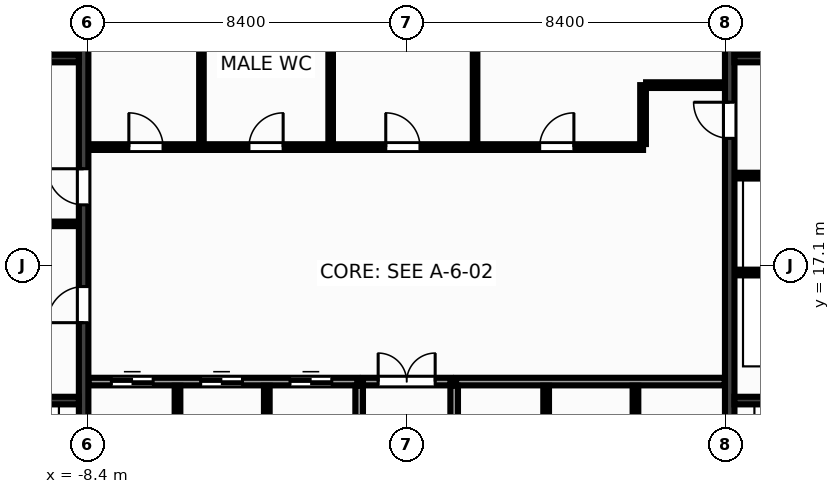
"""IFC4 building model, lengths in metres.
Left out: names, types, materials, properties, quantities, classifications, styles, units other than length and angle.
Written with IfcOpenShell. Run it as: python <this file> out.ifc"""

import sys

from ifc_helpers import new_model, si_unit, direction, frame, frame_2d, origin, place, context, subcontext, project, spatial, rectangle, extrude, source, transform, mapped, element, fill, save


model = new_model("IFC4")
c1 = context("Model", 3, precision=1e-05, world=origin(), true_north=direction((0.0, 1.0)))
c2 = subcontext(c1, "Body", "Model", "MODEL_VIEW")
j1 = project(units=[si_unit("LENGTHUNIT", "METRE"), si_unit("PLANEANGLEUNIT", "RADIAN")], contexts=[c1])
p1 = place(None, origin())
s1 = spatial("IfcSite", under=j1, at=p1, CompositionType="ELEMENT")
p2 = place(p1, origin())
s2 = spatial("IfcBuilding", under=s1, at=p2, CompositionType="ELEMENT")
p3 = place(p2, frame((0.0, 0.0, 9.65)))
s3 = spatial("IfcBuildingStorey", under=s2, at=p3, CompositionType="ELEMENT", Elevation=9.65)
m1 = source(origin(), c2, "Body", "SweptSolid", [
    extrude(rectangle(XDim=12.8, YDim=0.25, at=frame_2d((6.4, 0.0))), origin(), (0.0, 0.0, 1.0), 4.65),
])
p4 = place(p3, frame((-8.5, 10.6, 0.0), z_axis=(0.0, 0.0, 1.0), x_axis=(0.0, 1.0, 0.0)))
e1 = element("IfcWall", 1, at=p4, inside=s3, PredefinedType="SHEAR", context=c2, shape_type="MappedRepresentation", body=[
    mapped(m1, transform((0.0, 0.0, 0.0), x_axis=(1.0, 0.0, 0.0), y_axis=(0.0, 1.0, 0.0), z_axis=(0.0, 0.0, 1.0), scale=1.0)),
])
p5 = place(p4, frame((5.0, 0.0, 0.0)))
e2 = element("IfcOpeningElement", 2, at=p5, cuts=e1, PredefinedType="OPENING", context=c2, shape_type="SweptSolid", body=[
    extrude(rectangle(XDim=0.95, YDim=2.15, at=frame_2d((0.475, 1.075))), frame((0.0, 0.137, 0.0), z_axis=(0.0, -1.0, 0.0), x_axis=(1.0, 0.0, 0.0)), (0.0, 0.0, 1.0), 0.274),
])
p6 = place(p4, frame((8.1, 0.0, 0.0)))
e3 = element("IfcOpeningElement", 3, at=p6, cuts=e1, PredefinedType="OPENING", context=c2, shape_type="SweptSolid", body=[
    extrude(rectangle(XDim=0.95, YDim=2.15, at=frame_2d((0.475, 1.075))), frame((0.0, 0.137, 0.0), z_axis=(0.0, -1.0, 0.0), x_axis=(1.0, 0.0, 0.0)), (0.0, 0.0, 1.0), 0.274),
])
p7 = place(p3, frame((8.5, 10.6, 0.0), z_axis=(0.0, 0.0, 1.0), x_axis=(0.0, 1.0, 0.0)))
e4 = element("IfcWall", 4, at=p7, inside=s3, PredefinedType="SHEAR", context=c2, shape_type="MappedRepresentation", body=[
    mapped(m1, transform((0.0, 0.0, 0.0), x_axis=(1.0, 0.0, 0.0), y_axis=(0.0, 1.0, 0.0), z_axis=(0.0, 0.0, 1.0), scale=1.0)),
])
p8 = place(p7, frame((9.85, 0.0, 0.0)))
e5 = element("IfcOpeningElement", 5, at=p8, cuts=e4, PredefinedType="OPENING", context=c2, shape_type="SweptSolid", body=[
    extrude(rectangle(XDim=0.95, YDim=2.15, at=frame_2d((0.475, 1.075))), frame((0.0, 0.137, 0.0), z_axis=(0.0, -1.0, 0.0), x_axis=(1.0, 0.0, 0.0)), (0.0, 0.0, 1.0), 0.274),
])
m2 = source(origin(), c2, "Body", "SweptSolid", [
    extrude(rectangle(XDim=2.825, YDim=0.2, at=frame_2d((1.413, 0.0))), origin(), (0.0, 0.0, 1.0), 4.65),
])
for number, where, z_axis, x_axis in (
    (6, (-11.45, 13.55, 0.0), (0.0, 0.0, 1.0), (1.0, 0.0, 0.0)),
    (7, (8.625, 13.55, 0.0), (0.0, 0.0, 1.0), (1.0, 0.0, 0.0)),
):
    element("IfcWall", number, at=place(p3, frame(where, z_axis=z_axis, x_axis=x_axis)), inside=s3, PredefinedType="SHEAR", context=c2, shape_type="MappedRepresentation", body=[
        mapped(m2, transform((0.0, 0.0, 0.0), x_axis=(1.0, 0.0, 0.0), y_axis=(0.0, 1.0, 0.0), z_axis=(0.0, 0.0, 1.0), scale=1.0)),
    ])
m3 = source(origin(), c2, "Body", "SweptSolid", [
    extrude(rectangle(XDim=3.02, YDim=0.2, at=frame_2d((1.51, 0.0))), origin(), (0.0, 0.0, 1.0), 4.65),
])
for number, where, z_axis, x_axis in (
    (8, (-11.645, 22.55, 0.0), (0.0, 0.0, 1.0), (1.0, 0.0, 0.0)),
    (9, (8.625, 22.55, 0.0), (0.0, 0.0, 1.0), (1.0, 0.0, 0.0)),
):
    element("IfcWall", number, at=place(p3, frame(where, z_axis=z_axis, x_axis=x_axis)), inside=s3, PredefinedType="SHEAR", context=c2, shape_type="MappedRepresentation", body=[
        mapped(m3, transform((0.0, 0.0, 0.0), x_axis=(1.0, 0.0, 0.0), y_axis=(0.0, 1.0, 0.0), z_axis=(0.0, 0.0, 1.0), scale=1.0)),
    ])
m4 = source(origin(), c2, "Body", "SweptSolid", [
    extrude(rectangle(XDim=3.01, YDim=0.12, at=frame_2d((1.505, 0.0))), origin(), (0.0, 0.0, 1.0), 4.37),
])
p9 = place(p3, frame((-11.64, 18.2, 0.0), z_axis=(0.0, 0.0, 1.0), x_axis=(1.0, 0.0, 0.0)))
e10 = element("IfcWall", 10, at=p9, inside=s3, PredefinedType="PARTITIONING", context=c2, shape_type="MappedRepresentation", body=[
    mapped(m4, transform((0.0, 0.0, 0.0), x_axis=(1.0, 0.0, 0.0), y_axis=(0.0, 1.0, 0.0), z_axis=(0.0, 0.0, 1.0), scale=1.0)),
])
m5 = source(origin(), c2, "Body", "SweptSolid", [
    extrude(rectangle(XDim=3.01, YDim=0.15, at=frame_2d((1.505, 0.0))), origin(), (0.0, 0.0, 1.0), 4.37),
])
for number, where, z_axis, x_axis in (
    (11, (8.63, 16.92, 0.0), (0.0, 0.0, 1.0), (1.0, 0.0, 0.0)),
    (12, (8.63, 19.47, 0.0), (0.0, 0.0, 1.0), (1.0, 0.0, 0.0)),
):
    element("IfcWall", number, at=place(p3, frame(where, z_axis=z_axis, x_axis=x_axis)), inside=s3, PredefinedType="PARTITIONING", context=c2, shape_type="MappedRepresentation", body=[
        mapped(m5, transform((0.0, 0.0, 0.0), x_axis=(1.0, 0.0, 0.0), y_axis=(0.0, 1.0, 0.0), z_axis=(0.0, 0.0, 1.0), scale=1.0)),
    ])
m6 = source(origin(), c2, "Body", "SweptSolid", [
    extrude(rectangle(XDim=7.07, YDim=0.2, at=frame_2d((3.535, 0.0))), origin(), (0.0, 0.0, 1.0), 4.37),
])
p10 = place(p3, frame((-8.37, 14.05, 0.0), z_axis=(0.0, 0.0, 1.0), x_axis=(1.0, 0.0, 0.0)))
e13 = element("IfcWall", 13, at=p10, inside=s3, PredefinedType="PARTITIONING", context=c2, shape_type="MappedRepresentation", body=[
    mapped(m6, transform((0.0, 0.0, 0.0), x_axis=(1.0, 0.0, 0.0), y_axis=(0.0, 1.0, 0.0), z_axis=(0.0, 0.0, 1.0), scale=1.0)),
])
p11 = place(p10, frame((0.6, 0.0, 0.0)))
e14 = element("IfcOpeningElement", 14, at=p11, cuts=e13, PredefinedType="OPENING", context=c2, shape_type="SweptSolid", body=[
    extrude(rectangle(XDim=1.1, YDim=2.15, at=frame_2d((0.55, 1.075))), frame((0.0, 0.112, 0.0), z_axis=(0.0, -1.0, 0.0), x_axis=(1.0, 0.0, 0.0)), (0.0, 0.0, 1.0), 0.224),
])
p12 = place(p10, frame((2.95, 0.0, 0.0)))
e15 = element("IfcOpeningElement", 15, at=p12, cuts=e13, PredefinedType="OPENING", context=c2, shape_type="SweptSolid", body=[
    extrude(rectangle(XDim=1.1, YDim=2.15, at=frame_2d((0.55, 1.075))), frame((0.0, 0.112, 0.0), z_axis=(0.0, -1.0, 0.0), x_axis=(1.0, 0.0, 0.0)), (0.0, 0.0, 1.0), 0.224),
])
p13 = place(p10, frame((5.3, 0.0, 0.0)))
e16 = element("IfcOpeningElement", 16, at=p13, cuts=e13, PredefinedType="OPENING", context=c2, shape_type="SweptSolid", body=[
    extrude(rectangle(XDim=1.1, YDim=2.15, at=frame_2d((0.55, 1.075))), frame((0.0, 0.112, 0.0), z_axis=(0.0, -1.0, 0.0), x_axis=(1.0, 0.0, 0.0)), (0.0, 0.0, 1.0), 0.224),
])
p14 = place(p3, frame((1.3, 14.05, 0.0), z_axis=(0.0, 0.0, 1.0), x_axis=(1.0, 0.0, 0.0)))
e17 = element("IfcWall", 17, at=p14, inside=s3, PredefinedType="PARTITIONING", context=c2, shape_type="MappedRepresentation", body=[
    mapped(m6, transform((0.0, 0.0, 0.0), x_axis=(1.0, 0.0, 0.0), y_axis=(0.0, 1.0, 0.0), z_axis=(0.0, 0.0, 1.0), scale=1.0)),
])
m7 = source(origin(), c2, "Body", "SweptSolid", [
    extrude(rectangle(XDim=3.34, YDim=0.2, at=frame_2d((1.67, 0.0))), origin(), (0.0, 0.0, 1.0), 4.37),
])
for number, where, z_axis, x_axis in (
    (18, (-1.25, 10.6, 0.0), (0.0, 0.0, 1.0), (0.0, 1.0, 0.0)),
    (19, (1.25, 10.6, 0.0), (0.0, 0.0, 1.0), (0.0, 1.0, 0.0)),
):
    element("IfcWall", number, at=place(p3, frame(where, z_axis=z_axis, x_axis=x_axis)), inside=s3, PredefinedType="PARTITIONING", context=c2, shape_type="MappedRepresentation", body=[
        mapped(m7, transform((0.0, 0.0, 0.0), x_axis=(1.0, 0.0, 0.0), y_axis=(0.0, 1.0, 0.0), z_axis=(0.0, 0.0, 1.0), scale=1.0)),
    ])
m8 = source(origin(), c2, "Body", "SweptSolid", [
    extrude(rectangle(XDim=2.3, YDim=0.2, at=frame_2d((1.15, 0.0))), origin(), (0.0, 0.0, 1.0), 4.37),
])
p15 = place(p3, frame((-1.15, 14.05, 0.0), z_axis=(0.0, 0.0, 1.0), x_axis=(1.0, 0.0, 0.0)))
e20 = element("IfcWall", 20, at=p15, inside=s3, PredefinedType="PARTITIONING", context=c2, shape_type="MappedRepresentation", body=[
    mapped(m8, transform((0.0, 0.0, 0.0), x_axis=(1.0, 0.0, 0.0), y_axis=(0.0, 1.0, 0.0), z_axis=(0.0, 0.0, 1.0), scale=1.0)),
])
p16 = place(p15, frame((0.4, 0.0, 0.0)))
e21 = element("IfcOpeningElement", 21, at=p16, cuts=e20, PredefinedType="OPENING", context=c2, shape_type="SweptSolid", body=[
    extrude(rectangle(XDim=1.5, YDim=2.2, at=frame_2d((0.75, 1.1))), frame((0.0, 0.112, 0.0), z_axis=(0.0, -1.0, 0.0), x_axis=(1.0, 0.0, 0.0)), (0.0, 0.0, 1.0), 0.224),
])
m9 = source(origin(), c2, "Body", "SweptSolid", [
    extrude(rectangle(XDim=14.59, YDim=0.15, at=frame_2d((7.295, 0.0))), origin(), (0.0, 0.0, 1.0), 4.37),
])
p17 = place(p3, frame((-8.37, 20.22, 0.0), z_axis=(0.0, 0.0, 1.0), x_axis=(1.0, 0.0, 0.0)))
e22 = element("IfcWall", 22, at=p17, inside=s3, PredefinedType="PARTITIONING", context=c2, shape_type="MappedRepresentation", body=[
    mapped(m9, transform((0.0, 0.0, 0.0), x_axis=(1.0, 0.0, 0.0), y_axis=(0.0, 1.0, 0.0), z_axis=(0.0, 0.0, 1.0), scale=1.0)),
])
p18 = place(p17, frame((1.06, 0.0, 0.0)))
e23 = element("IfcOpeningElement", 23, at=p18, cuts=e22, PredefinedType="OPENING", context=c2, shape_type="SweptSolid", body=[
    extrude(rectangle(XDim=0.9, YDim=2.15, at=frame_2d((0.45, 1.075))), frame((0.0, 0.087, 0.0), z_axis=(0.0, -1.0, 0.0), x_axis=(1.0, 0.0, 0.0)), (0.0, 0.0, 1.0), 0.174),
])
p19 = place(p17, frame((4.22, 0.0, 0.0)))
e24 = element("IfcOpeningElement", 24, at=p19, cuts=e22, PredefinedType="OPENING", context=c2, shape_type="SweptSolid", body=[
    extrude(rectangle(XDim=0.9, YDim=2.15, at=frame_2d((0.45, 1.075))), frame((0.0, 0.087, 0.0), z_axis=(0.0, -1.0, 0.0), x_axis=(1.0, 0.0, 0.0)), (0.0, 0.0, 1.0), 0.174),
])
p20 = place(p17, frame((7.82, 0.0, 0.0)))
e25 = element("IfcOpeningElement", 25, at=p20, cuts=e22, PredefinedType="OPENING", context=c2, shape_type="SweptSolid", body=[
    extrude(rectangle(XDim=0.9, YDim=2.15, at=frame_2d((0.45, 1.075))), frame((0.0, 0.087, 0.0), z_axis=(0.0, -1.0, 0.0), x_axis=(1.0, 0.0, 0.0)), (0.0, 0.0, 1.0), 0.174),
])
p21 = place(p17, frame((11.87, 0.0, 0.0)))
e26 = element("IfcOpeningElement", 26, at=p21, cuts=e22, PredefinedType="OPENING", context=c2, shape_type="SweptSolid", body=[
    extrude(rectangle(XDim=0.9, YDim=2.15, at=frame_2d((0.45, 1.075))), frame((0.0, 0.087, 0.0), z_axis=(0.0, -1.0, 0.0), x_axis=(1.0, 0.0, 0.0)), (0.0, 0.0, 1.0), 0.174),
])
m10 = source(origin(), c2, "Body", "SweptSolid", [
    extrude(rectangle(XDim=1.55, YDim=0.15, at=frame_2d((0.775, 0.0))), origin(), (0.0, 0.0, 1.0), 4.37),
])
p22 = place(p3, frame((6.22, 20.3, 0.0), z_axis=(0.0, 0.0, 1.0), x_axis=(0.0, 1.0, 0.0)))
e27 = element("IfcWall", 27, at=p22, inside=s3, PredefinedType="PARTITIONING", context=c2, shape_type="MappedRepresentation", body=[
    mapped(m10, transform((0.0, 0.0, 0.0), x_axis=(1.0, 0.0, 0.0), y_axis=(0.0, 1.0, 0.0), z_axis=(0.0, 0.0, 1.0), scale=1.0)),
])
m11 = source(origin(), c2, "Body", "SweptSolid", [
    extrude(rectangle(XDim=2.07, YDim=0.15, at=frame_2d((1.035, 0.0))), origin(), (0.0, 0.0, 1.0), 4.37),
])
p23 = place(p3, frame((6.3, 21.85, 0.0), z_axis=(0.0, 0.0, 1.0), x_axis=(1.0, 0.0, 0.0)))
e28 = element("IfcWall", 28, at=p23, inside=s3, PredefinedType="PARTITIONING", context=c2, shape_type="MappedRepresentation", body=[
    mapped(m11, transform((0.0, 0.0, 0.0), x_axis=(1.0, 0.0, 0.0), y_axis=(0.0, 1.0, 0.0), z_axis=(0.0, 0.0, 1.0), scale=1.0)),
])
m12 = source(origin(), c2, "Body", "SweptSolid", [
    extrude(rectangle(XDim=3.34, YDim=0.15, at=frame_2d((1.67, 0.0))), origin(), (0.0, 0.0, 1.0), 4.37),
])
for number, where, z_axis, x_axis in (
    (29, (-6.03, 10.6, 0.0), (0.0, 0.0, 1.0), (0.0, 1.0, 0.0)),
    (30, (-3.68, 10.6, 0.0), (0.0, 0.0, 1.0), (0.0, 1.0, 0.0)),
    (31, (3.67, 10.6, 0.0), (0.0, 0.0, 1.0), (0.0, 1.0, 0.0)),
    (32, (6.02, 10.6, 0.0), (0.0, 0.0, 1.0), (0.0, 1.0, 0.0)),
):
    element("IfcWall", number, at=place(p3, frame(where, z_axis=z_axis, x_axis=x_axis)), inside=s3, PredefinedType="PARTITIONING", context=c2, shape_type="MappedRepresentation", body=[
        mapped(m12, transform((0.0, 0.0, 0.0), x_axis=(1.0, 0.0, 0.0), y_axis=(0.0, 1.0, 0.0), z_axis=(0.0, 0.0, 1.0), scale=1.0)),
    ])
m13 = source(origin(), c2, "Body", "SweptSolid", [
    extrude(rectangle(XDim=3.04, YDim=0.12, at=frame_2d((1.52, 0.0))), origin(), (0.0, 0.0, 1.0), 4.37),
])
for number, where, z_axis, x_axis in (
    (33, (-5.4, 20.32, 0.0), (0.0, 0.0, 1.0), (0.0, 1.0, 0.0)),
    (34, (-2.0, 20.32, 0.0), (0.0, 0.0, 1.0), (0.0, 1.0, 0.0)),
    (35, (1.8, 20.32, 0.0), (0.0, 0.0, 1.0), (0.0, 1.0, 0.0)),
):
    element("IfcWall", number, at=place(p3, frame(where, z_axis=z_axis, x_axis=x_axis)), inside=s3, PredefinedType="PARTITIONING", context=c2, shape_type="MappedRepresentation", body=[
        mapped(m13, transform((0.0, 0.0, 0.0), x_axis=(1.0, 0.0, 0.0), y_axis=(0.0, 1.0, 0.0), z_axis=(0.0, 0.0, 1.0), scale=1.0)),
    ])
m14 = source(origin(), c2, "Body", "SweptSolid", [
    extrude(rectangle(XDim=0.95, YDim=2.15, at=frame_2d((0.475, 1.075))), frame((0.0, 0.025, 0.0), z_axis=(0.0, -1.0, 0.0), x_axis=(1.0, 0.0, 0.0)), (0.0, 0.0, 1.0), 0.05),
])
p24 = place(p5, origin())
e36 = element("IfcDoor", 36, at=p24, inside=s3, OperationType="SINGLE_SWING_LEFT", PredefinedType="DOOR", context=c2, shape_type="MappedRepresentation", body=[
    mapped(m14, transform((0.0, 0.0, 0.0), x_axis=(1.0, 0.0, 0.0), y_axis=(0.0, 1.0, 0.0), z_axis=(0.0, 0.0, 1.0), scale=1.0)),
])
fill(e2, e36)
p25 = place(p6, origin())
e37 = element("IfcDoor", 37, at=p25, inside=s3, OperationType="SINGLE_SWING_RIGHT", PredefinedType="DOOR", context=c2, shape_type="MappedRepresentation", body=[
    mapped(m14, transform((0.0, 0.0, 0.0), x_axis=(1.0, 0.0, 0.0), y_axis=(0.0, 1.0, 0.0), z_axis=(0.0, 0.0, 1.0), scale=1.0)),
])
fill(e3, e37)
m15 = source(origin(), c2, "Body", "SweptSolid", [
    extrude(rectangle(XDim=0.95, YDim=2.15, at=frame_2d((0.475, 1.075))), frame((0.0, 0.025, 0.0), z_axis=(0.0, -1.0, 0.0), x_axis=(1.0, 0.0, 0.0)), (0.0, 0.0, 1.0), 0.05),
])
p26 = place(p8, origin())
e38 = element("IfcDoor", 38, at=p26, inside=s3, OperationType="SINGLE_SWING_RIGHT", PredefinedType="DOOR", context=c2, shape_type="MappedRepresentation", body=[
    mapped(m15, transform((0.0, 0.0, 0.0), x_axis=(1.0, 0.0, 0.0), y_axis=(0.0, 1.0, 0.0), z_axis=(0.0, 0.0, 1.0), scale=1.0)),
])
fill(e5, e38)
m16 = source(origin(), c2, "Body", "SweptSolid", [
    extrude(rectangle(XDim=1.1, YDim=2.15, at=frame_2d((0.55, 1.075))), frame((0.0, 0.025, 0.0), z_axis=(0.0, -1.0, 0.0), x_axis=(1.0, 0.0, 0.0)), (0.0, 0.0, 1.0), 0.05),
])
p27 = place(p11, origin())
e39 = element("IfcDoor", 39, at=p27, inside=s3, OperationType="DOUBLE_DOOR_SLIDING", PredefinedType="DOOR", context=c2, shape_type="MappedRepresentation", body=[
    mapped(m16, transform((0.0, 0.0, 0.0), x_axis=(1.0, 0.0, 0.0), y_axis=(0.0, 1.0, 0.0), z_axis=(0.0, 0.0, 1.0), scale=1.0)),
])
fill(e14, e39)
p28 = place(p12, origin())
e40 = element("IfcDoor", 40, at=p28, inside=s3, OperationType="DOUBLE_DOOR_SLIDING", PredefinedType="DOOR", context=c2, shape_type="MappedRepresentation", body=[
    mapped(m16, transform((0.0, 0.0, 0.0), x_axis=(1.0, 0.0, 0.0), y_axis=(0.0, 1.0, 0.0), z_axis=(0.0, 0.0, 1.0), scale=1.0)),
])
fill(e15, e40)
p29 = place(p13, origin())
e41 = element("IfcDoor", 41, at=p29, inside=s3, OperationType="DOUBLE_DOOR_SLIDING", PredefinedType="DOOR", context=c2, shape_type="MappedRepresentation", body=[
    mapped(m16, transform((0.0, 0.0, 0.0), x_axis=(1.0, 0.0, 0.0), y_axis=(0.0, 1.0, 0.0), z_axis=(0.0, 0.0, 1.0), scale=1.0)),
])
fill(e16, e41)
m17 = source(origin(), c2, "Body", "SweptSolid", [
    extrude(rectangle(XDim=1.5, YDim=2.2, at=frame_2d((0.75, 1.1))), frame((0.0, 0.025, 0.0), z_axis=(0.0, -1.0, 0.0), x_axis=(1.0, 0.0, 0.0)), (0.0, 0.0, 1.0), 0.05),
])
p30 = place(p16, origin())
e42 = element("IfcDoor", 42, at=p30, inside=s3, OperationType="DOUBLE_DOOR_SINGLE_SWING", PredefinedType="DOOR", context=c2, shape_type="MappedRepresentation", body=[
    mapped(m17, transform((0.0, 0.0, 0.0), x_axis=(1.0, 0.0, 0.0), y_axis=(0.0, 1.0, 0.0), z_axis=(0.0, 0.0, 1.0), scale=1.0)),
])
fill(e21, e42)
m18 = source(origin(), c2, "Body", "SweptSolid", [
    extrude(rectangle(XDim=0.9, YDim=2.15, at=frame_2d((0.45, 1.075))), frame((0.0, 0.025, 0.0), z_axis=(0.0, -1.0, 0.0), x_axis=(1.0, 0.0, 0.0)), (0.0, 0.0, 1.0), 0.05),
])
p31 = place(p18, origin())
e43 = element("IfcDoor", 43, at=p31, inside=s3, OperationType="SINGLE_SWING_LEFT", PredefinedType="DOOR", context=c2, shape_type="MappedRepresentation", body=[
    mapped(m18, transform((0.0, 0.0, 0.0), x_axis=(1.0, 0.0, 0.0), y_axis=(0.0, 1.0, 0.0), z_axis=(0.0, 0.0, 1.0), scale=1.0)),
])
fill(e23, e43)
p32 = place(p19, origin())
e44 = element("IfcDoor", 44, at=p32, inside=s3, OperationType="SINGLE_SWING_RIGHT", PredefinedType="DOOR", context=c2, shape_type="MappedRepresentation", body=[
    mapped(m18, transform((0.0, 0.0, 0.0), x_axis=(1.0, 0.0, 0.0), y_axis=(0.0, 1.0, 0.0), z_axis=(0.0, 0.0, 1.0), scale=1.0)),
])
fill(e24, e44)
p33 = place(p20, origin())
e45 = element("IfcDoor", 45, at=p33, inside=s3, OperationType="SINGLE_SWING_LEFT", PredefinedType="DOOR", context=c2, shape_type="MappedRepresentation", body=[
    mapped(m18, transform((0.0, 0.0, 0.0), x_axis=(1.0, 0.0, 0.0), y_axis=(0.0, 1.0, 0.0), z_axis=(0.0, 0.0, 1.0), scale=1.0)),
])
fill(e25, e45)
p34 = place(p21, origin())
e46 = element("IfcDoor", 46, at=p34, inside=s3, OperationType="SINGLE_SWING_RIGHT", PredefinedType="DOOR", context=c2, shape_type="MappedRepresentation", body=[
    mapped(m18, transform((0.0, 0.0, 0.0), x_axis=(1.0, 0.0, 0.0), y_axis=(0.0, 1.0, 0.0), z_axis=(0.0, 0.0, 1.0), scale=1.0)),
])
fill(e26, e46)
save(model, sys.argv[1])
